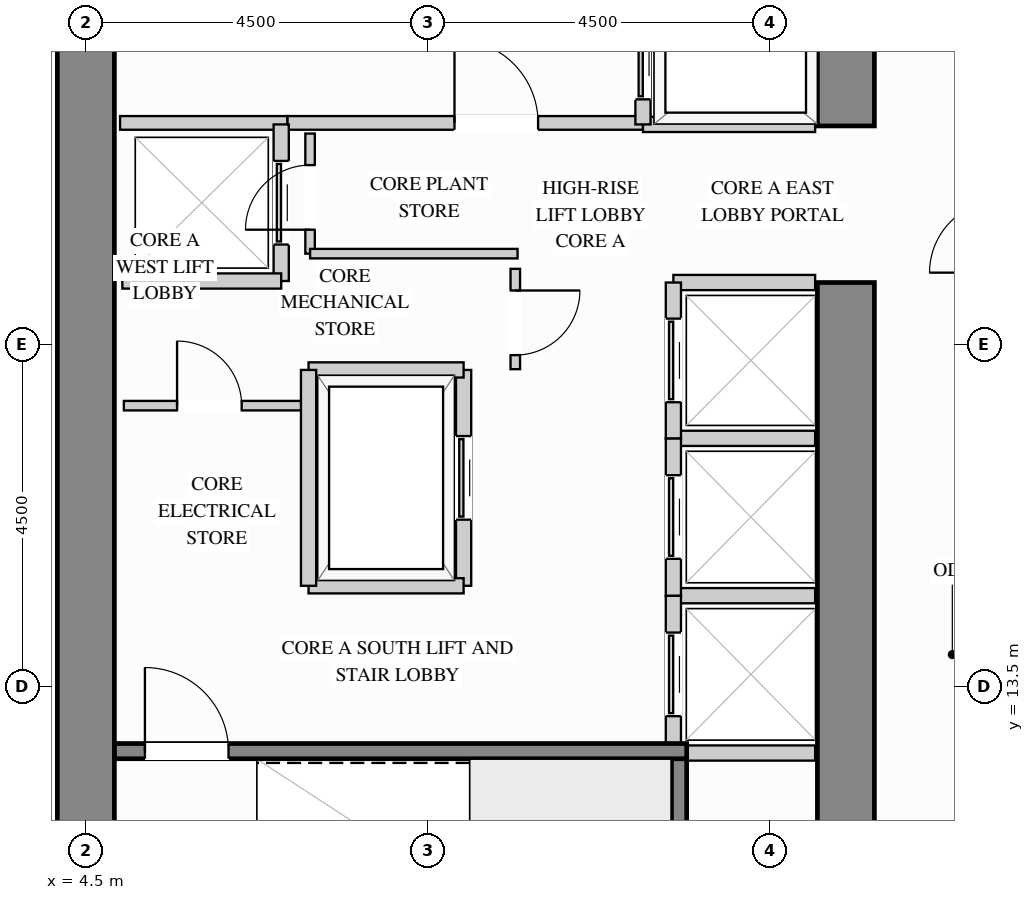
"""IFC4 building model, lengths in metres.
Left out: names, types, materials, properties, quantities, classifications, styles, units other than length and angle.
Written with IfcOpenShell. Run it as: python <this file> out.ifc"""

import sys

from ifc_helpers import new_model, si_unit, direction, frame, frame_2d, origin, place, context, subcontext, project, spatial, rectangle, extrude, source, transform, mapped, element, fill, save


model = new_model("IFC4")
c1 = context("Model", 3, precision=1e-05, world=origin(), true_north=direction((0.0, 1.0)))
c2 = subcontext(c1, "Body", "Model", "MODEL_VIEW")
j1 = project(units=[si_unit("LENGTHUNIT", "METRE"), si_unit("PLANEANGLEUNIT", "RADIAN")], contexts=[c1])
p1 = place(None, origin())
s1 = spatial("IfcSite", under=j1, at=p1, CompositionType="ELEMENT")
p2 = place(p1, origin())
s2 = spatial("IfcBuilding", under=s1, at=p2, CompositionType="ELEMENT")
p3 = place(p2, frame((0.0, 0.0, 109.8)))
s3 = spatial("IfcBuildingStorey", under=s2, at=p3, CompositionType="ELEMENT", Elevation=109.8)
m1 = source(origin(), c2, "Body", "SweptSolid", [
    extrude(rectangle(XDim=9.945, YDim=0.75, at=frame_2d((4.973, 0.0))), origin(), (0.0, 0.0, 1.0), 3.38),
])
p4 = place(p3, frame((14.5, 8.875, 0.0), z_axis=(0.0, 0.0, 1.0), x_axis=(0.0, 1.0, 0.0)))
e1 = element("IfcWall", 1, at=p4, inside=s3, PredefinedType="SHEAR", context=c2, shape_type="MappedRepresentation", body=[
    mapped(m1, transform((0.0, 0.0, 0.0), x_axis=(1.0, 0.0, 0.0), y_axis=(0.0, 1.0, 0.0), z_axis=(0.0, 0.0, 1.0))),
])
m2 = source(origin(), c2, "Body", "SweptSolid", [
    extrude(rectangle(XDim=8.245, YDim=0.75, at=frame_2d((4.123, 0.0))), origin(), (0.0, 0.0, 1.0), 3.38),
])
p5 = place(p3, frame((14.5, 20.88, 0.0), z_axis=(0.0, 0.0, 1.0), x_axis=(0.0, 1.0, 0.0)))
e2 = element("IfcWall", 2, at=p5, inside=s3, PredefinedType="SHEAR", context=c2, shape_type="MappedRepresentation", body=[
    mapped(m2, transform((0.0, 0.0, 0.0), x_axis=(1.0, 0.0, 0.0), y_axis=(0.0, 1.0, 0.0), z_axis=(0.0, 0.0, 1.0))),
])
m3 = source(origin(), c2, "Body", "SweptSolid", [
    extrude(rectangle(XDim=20.25, YDim=0.75, at=frame_2d((10.125, 0.0))), origin(), (0.0, 0.0, 1.0), 3.38),
])
p6 = place(p3, frame((4.5, 8.875, 0.0), z_axis=(0.0, 0.0, 1.0), x_axis=(0.0, 1.0, 0.0)))
e3 = element("IfcWall", 3, at=p6, inside=s3, PredefinedType="SHEAR", context=c2, shape_type="MappedRepresentation", body=[
    mapped(m3, transform((0.0, 0.0, 0.0), x_axis=(1.0, 0.0, 0.0), y_axis=(0.0, 1.0, 0.0), z_axis=(0.0, 0.0, 1.0))),
])
p7 = place(p3, frame((7.15, 20.92, 0.0), z_axis=(0.0, 0.0, 1.0), x_axis=(1.0, 0.0, 0.0)))
e4 = element("IfcWall", 4, at=p7, inside=s3, PredefinedType="PARTITIONING", context=c2, shape_type="SweptSolid", body=[
    extrude(rectangle(XDim=4.68, YDim=0.18, at=frame_2d((2.34, 0.0))), origin(), (0.0, 0.0, 1.0), 3.365),
])
p8 = place(p7, frame((2.2, 0.0, 0.0)))
e5 = element("IfcOpeningElement", 5, at=p8, cuts=e4, PredefinedType="OPENING", context=c2, shape_type="SweptSolid", body=[
    extrude(rectangle(XDim=1.1, YDim=2.15, at=frame_2d((0.55, 1.075))), frame((0.0, 0.1, 0.0), z_axis=(0.0, -1.0, 0.0), x_axis=(1.0, 0.0, 0.0)), (0.0, 0.0, 1.0), 0.2),
])
m4 = source(origin(), c2, "Body", "SweptSolid", [
    extrude(rectangle(XDim=2.2, YDim=0.18, at=frame_2d((1.1, 0.0))), origin(), (0.0, 0.0, 1.0), 3.365),
])
p9 = place(p3, frame((4.95, 20.92, 0.0), z_axis=(0.0, 0.0, 1.0), x_axis=(1.0, 0.0, 0.0)))
e6 = element("IfcWall", 6, at=p9, inside=s3, PredefinedType="PARTITIONING", context=c2, shape_type="MappedRepresentation", body=[
    mapped(m4, transform((0.0, 0.0, 0.0), x_axis=(1.0, 0.0, 0.0), y_axis=(0.0, 1.0, 0.0), z_axis=(0.0, 0.0, 1.0))),
])
p10 = place(p3, frame((10.15, 17.68, 0.0), z_axis=(0.0, 0.0, 1.0), x_axis=(0.0, 1.0, 0.0)))
e7 = element("IfcWall", 7, at=p10, inside=s3, PredefinedType="PARTITIONING", context=c2, shape_type="SweptSolid", body=[
    extrude(rectangle(XDim=1.32, YDim=0.125, at=frame_2d((0.66, 0.0))), origin(), (0.0, 0.0, 1.0), 3.365),
])
p11 = place(p10, frame((0.185, 0.0, 0.0)))
e8 = element("IfcOpeningElement", 8, at=p11, cuts=e7, PredefinedType="OPENING", context=c2, shape_type="SweptSolid", body=[
    extrude(rectangle(XDim=0.85, YDim=2.1, at=frame_2d((0.425, 1.05))), frame((0.0, 0.073, 0.0), z_axis=(0.0, -1.0, 0.0), x_axis=(1.0, 0.0, 0.0)), (0.0, 0.0, 1.0), 0.145),
])
p12 = place(p3, frame((7.45, 19.2, 0.0), z_axis=(0.0, 0.0, 1.0), x_axis=(0.0, 1.0, 0.0)))
e9 = element("IfcWall", 9, at=p12, inside=s3, PredefinedType="PARTITIONING", context=c2, shape_type="SweptSolid", body=[
    extrude(rectangle(XDim=1.58, YDim=0.125, at=frame_2d((0.79, 0.0))), origin(), (0.0, 0.0, 1.0), 3.365),
])
p13 = place(p12, frame((0.315, 0.0, 0.0)))
e10 = element("IfcOpeningElement", 10, at=p13, cuts=e9, PredefinedType="OPENING", context=c2, shape_type="SweptSolid", body=[
    extrude(rectangle(XDim=0.85, YDim=2.1, at=frame_2d((0.425, 1.05))), frame((0.0, 0.073, 0.0), z_axis=(0.0, -1.0, 0.0), x_axis=(1.0, 0.0, 0.0)), (0.0, 0.0, 1.0), 0.145),
])
m5 = source(origin(), c2, "Body", "SweptSolid", [
    extrude(rectangle(XDim=2.73, YDim=0.125, at=frame_2d((1.365, 0.0))), origin(), (0.0, 0.0, 1.0), 3.365),
])
p14 = place(p3, frame((7.45, 19.2, 0.0), z_axis=(0.0, 0.0, 1.0), x_axis=(1.0, 0.0, 0.0)))
e11 = element("IfcWall", 11, at=p14, inside=s3, PredefinedType="PARTITIONING", context=c2, shape_type="MappedRepresentation", body=[
    mapped(m5, transform((0.0, 0.0, 0.0), x_axis=(1.0, 0.0, 0.0), y_axis=(0.0, 1.0, 0.0), z_axis=(0.0, 0.0, 1.0))),
])
p15 = place(p3, frame((5.0, 17.2, 0.0), z_axis=(0.0, 0.0, 1.0), x_axis=(1.0, 0.0, 0.0)))
e12 = element("IfcWall", 12, at=p15, inside=s3, PredefinedType="PARTITIONING", context=c2, shape_type="SweptSolid", body=[
    extrude(rectangle(XDim=2.4, YDim=0.125, at=frame_2d((1.2, 0.0))), origin(), (0.0, 0.0, 1.0), 3.365),
])
p16 = place(p15, frame((0.7, 0.0, 0.0)))
e13 = element("IfcOpeningElement", 13, at=p16, cuts=e12, PredefinedType="OPENING", context=c2, shape_type="SweptSolid", body=[
    extrude(rectangle(XDim=0.85, YDim=2.1, at=frame_2d((0.425, 1.05))), frame((0.0, 0.073, 0.0), z_axis=(0.0, -1.0, 0.0), x_axis=(1.0, 0.0, 0.0)), (0.0, 0.0, 1.0), 0.145),
])
m6 = source(origin(), c2, "Body", "SweptSolid", [
    extrude(rectangle(XDim=2.265, YDim=0.2, at=frame_2d((1.132, 0.0))), origin(), (0.0, 0.0, 1.0), 3.365),
])
p17 = place(p3, frame((11.83, 20.9, 0.0), z_axis=(0.0, 0.0, 1.0), x_axis=(1.0, 0.0, 0.0)))
e14 = element("IfcWall", 14, at=p17, inside=s3, PredefinedType="PARTITIONING", context=c2, shape_type="MappedRepresentation", body=[
    mapped(m6, transform((0.0, 0.0, 0.0), x_axis=(1.0, 0.0, 0.0), y_axis=(0.0, 1.0, 0.0), z_axis=(0.0, 0.0, 1.0))),
])
p18 = place(p3, frame((11.83, 20.9, 0.0), z_axis=(0.0, 0.0, 1.0), x_axis=(0.0, 1.0, 0.0)))
e15 = element("IfcWall", 15, at=p18, inside=s3, PredefinedType="PARTITIONING", context=c2, shape_type="SweptSolid", body=[
    extrude(rectangle(XDim=1.76, YDim=0.2, at=frame_2d((0.88, 0.0))), origin(), (0.0, 0.0, 1.0), 3.365),
])
p19 = place(p18, frame((0.33, 0.0, 0.0)))
e16 = element("IfcOpeningElement", 16, at=p19, cuts=e15, PredefinedType="OPENING", context=c2, shape_type="SweptSolid", body=[
    extrude(rectangle(XDim=1.1, YDim=2.2, at=frame_2d((0.55, 1.1))), frame((0.0, 0.11, 0.0), z_axis=(0.0, -1.0, 0.0), x_axis=(1.0, 0.0, 0.0)), (0.0, 0.0, 1.0), 0.22),
])
m7 = source(origin(), c2, "Body", "SweptSolid", [
    extrude(rectangle(XDim=1.865, YDim=0.2, at=frame_2d((0.933, 0.0))), origin(), (0.0, 0.0, 1.0), 3.365),
])
for number, where, z_axis, x_axis in (
    (17, (12.23, 14.7, 0.0), (0.0, 0.0, 1.0), (1.0, 0.0, 0.0)),
    (18, (12.23, 12.63, 0.0), (0.0, 0.0, 1.0), (1.0, 0.0, 0.0)),
):
    element("IfcWall", number, at=place(p3, frame(where, z_axis=z_axis, x_axis=x_axis)), inside=s3, PredefinedType="PARTITIONING", context=c2, shape_type="MappedRepresentation", body=[
        mapped(m7, transform((0.0, 0.0, 0.0), x_axis=(1.0, 0.0, 0.0), y_axis=(0.0, 1.0, 0.0), z_axis=(0.0, 0.0, 1.0))),
    ])
p20 = place(p3, frame((12.23, 12.63, 0.0), z_axis=(0.0, 0.0, 1.0), x_axis=(0.0, 1.0, 0.0)))
e19 = element("IfcWall", 19, at=p20, inside=s3, PredefinedType="PARTITIONING", context=c2, shape_type="SweptSolid", body=[
    extrude(rectangle(XDim=2.07, YDim=0.2, at=frame_2d((1.035, 0.0))), origin(), (0.0, 0.0, 1.0), 3.365),
])
p21 = place(p20, frame((0.485, 0.0, 0.0)))
e20 = element("IfcOpeningElement", 20, at=p21, cuts=e19, PredefinedType="OPENING", context=c2, shape_type="SweptSolid", body=[
    extrude(rectangle(XDim=1.1, YDim=2.2, at=frame_2d((0.55, 1.1))), frame((0.0, 0.11, 0.0), z_axis=(0.0, -1.0, 0.0), x_axis=(1.0, 0.0, 0.0)), (0.0, 0.0, 1.0), 0.22),
])
p22 = place(p3, frame((12.23, 16.77, 0.0), z_axis=(0.0, 0.0, 1.0), x_axis=(1.0, 0.0, 0.0)))
e21 = element("IfcWall", 21, at=p22, inside=s3, PredefinedType="PARTITIONING", context=c2, shape_type="MappedRepresentation", body=[
    mapped(m7, transform((0.0, 0.0, 0.0), x_axis=(1.0, 0.0, 0.0), y_axis=(0.0, 1.0, 0.0), z_axis=(0.0, 0.0, 1.0))),
])
p23 = place(p3, frame((12.23, 14.7, 0.0), z_axis=(0.0, 0.0, 1.0), x_axis=(0.0, 1.0, 0.0)))
e22 = element("IfcWall", 22, at=p23, inside=s3, PredefinedType="PARTITIONING", context=c2, shape_type="SweptSolid", body=[
    extrude(rectangle(XDim=2.07, YDim=0.2, at=frame_2d((1.035, 0.0))), origin(), (0.0, 0.0, 1.0), 3.365),
])
p24 = place(p23, frame((0.485, 0.0, 0.0)))
e23 = element("IfcOpeningElement", 23, at=p24, cuts=e22, PredefinedType="OPENING", context=c2, shape_type="SweptSolid", body=[
    extrude(rectangle(XDim=1.1, YDim=2.2, at=frame_2d((0.55, 1.1))), frame((0.0, 0.11, 0.0), z_axis=(0.0, -1.0, 0.0), x_axis=(1.0, 0.0, 0.0)), (0.0, 0.0, 1.0), 0.22),
])
p25 = place(p3, frame((12.23, 18.82, 0.0), z_axis=(0.0, 0.0, 1.0), x_axis=(1.0, 0.0, 0.0)))
e24 = element("IfcWall", 24, at=p25, inside=s3, PredefinedType="PARTITIONING", context=c2, shape_type="MappedRepresentation", body=[
    mapped(m7, transform((0.0, 0.0, 0.0), x_axis=(1.0, 0.0, 0.0), y_axis=(0.0, 1.0, 0.0), z_axis=(0.0, 0.0, 1.0))),
])
p26 = place(p3, frame((12.23, 16.77, 0.0), z_axis=(0.0, 0.0, 1.0), x_axis=(0.0, 1.0, 0.0)))
e25 = element("IfcWall", 25, at=p26, inside=s3, PredefinedType="PARTITIONING", context=c2, shape_type="SweptSolid", body=[
    extrude(rectangle(XDim=2.05, YDim=0.2, at=frame_2d((1.025, 0.0))), origin(), (0.0, 0.0, 1.0), 3.365),
])
p27 = place(p26, frame((0.475, 0.0, 0.0)))
e26 = element("IfcOpeningElement", 26, at=p27, cuts=e25, PredefinedType="OPENING", context=c2, shape_type="SweptSolid", body=[
    extrude(rectangle(XDim=1.1, YDim=2.2, at=frame_2d((0.55, 1.1))), frame((0.0, 0.11, 0.0), z_axis=(0.0, -1.0, 0.0), x_axis=(1.0, 0.0, 0.0)), (0.0, 0.0, 1.0), 0.22),
])
p28 = place(p3, frame((7.07, 18.84, 0.0), z_axis=(0.0, 0.0, 1.0), x_axis=(0.0, 1.0, 0.0)))
e27 = element("IfcWall", 27, at=p28, inside=s3, PredefinedType="PARTITIONING", context=c2, shape_type="SweptSolid", body=[
    extrude(rectangle(XDim=2.06, YDim=0.2, at=frame_2d((1.03, 0.0))), origin(), (0.0, 0.0, 1.0), 3.365),
])
p29 = place(p28, frame((0.48, 0.0, 0.0)))
e28 = element("IfcOpeningElement", 28, at=p29, cuts=e27, PredefinedType="OPENING", context=c2, shape_type="SweptSolid", body=[
    extrude(rectangle(XDim=1.1, YDim=2.2, at=frame_2d((0.55, 1.1))), frame((0.0, 0.11, 0.0), z_axis=(0.0, -1.0, 0.0), x_axis=(1.0, 0.0, 0.0)), (0.0, 0.0, 1.0), 0.22),
])
m8 = source(origin(), c2, "Body", "SweptSolid", [
    extrude(rectangle(XDim=2.09, YDim=0.2, at=frame_2d((1.045, 0.0))), origin(), (0.0, 0.0, 1.0), 3.365),
])
p30 = place(p3, frame((4.98, 18.84, 0.0), z_axis=(0.0, 0.0, 1.0), x_axis=(1.0, 0.0, 0.0)))
e29 = element("IfcWall", 29, at=p30, inside=s3, PredefinedType="PARTITIONING", context=c2, shape_type="MappedRepresentation", body=[
    mapped(m8, transform((0.0, 0.0, 0.0), x_axis=(1.0, 0.0, 0.0), y_axis=(0.0, 1.0, 0.0), z_axis=(0.0, 0.0, 1.0))),
])
p31 = place(p3, frame((9.47, 14.83, 0.0), z_axis=(0.0, 0.0, 1.0), x_axis=(0.0, 1.0, 0.0)))
e30 = element("IfcWall", 30, at=p31, inside=s3, PredefinedType="PARTITIONING", context=c2, shape_type="SweptSolid", body=[
    extrude(rectangle(XDim=2.84, YDim=0.2, at=frame_2d((1.42, 0.0))), origin(), (0.0, 0.0, 1.0), 3.365),
])
p32 = place(p31, frame((0.87, 0.0, 0.0)))
e31 = element("IfcOpeningElement", 31, at=p32, cuts=e30, PredefinedType="OPENING", context=c2, shape_type="SweptSolid", body=[
    extrude(rectangle(XDim=1.1, YDim=2.2, at=frame_2d((0.55, 1.1))), frame((0.0, 0.11, 0.0), z_axis=(0.0, -1.0, 0.0), x_axis=(1.0, 0.0, 0.0)), (0.0, 0.0, 1.0), 0.22),
])
m9 = source(origin(), c2, "Body", "SweptSolid", [
    extrude(rectangle(XDim=2.04, YDim=0.2, at=frame_2d((1.02, 0.0))), origin(), (0.0, 0.0, 1.0), 3.365),
])
for number, where, z_axis, x_axis in (
    (32, (7.43, 17.67, 0.0), (0.0, 0.0, 1.0), (1.0, 0.0, 0.0)),
    (33, (7.43, 14.83, 0.0), (0.0, 0.0, 1.0), (1.0, 0.0, 0.0)),
):
    element("IfcWall", number, at=place(p3, frame(where, z_axis=z_axis, x_axis=x_axis)), inside=s3, PredefinedType="PARTITIONING", context=c2, shape_type="MappedRepresentation", body=[
        mapped(m9, transform((0.0, 0.0, 0.0), x_axis=(1.0, 0.0, 0.0), y_axis=(0.0, 1.0, 0.0), z_axis=(0.0, 0.0, 1.0))),
    ])
m10 = source(origin(), c2, "Body", "SweptSolid", [
    extrude(rectangle(XDim=2.84, YDim=0.2, at=frame_2d((1.42, 0.0))), origin(), (0.0, 0.0, 1.0), 3.365),
])
p33 = place(p3, frame((7.43, 14.83, 0.0), z_axis=(0.0, 0.0, 1.0), x_axis=(0.0, 1.0, 0.0)))
e34 = element("IfcWall", 34, at=p33, inside=s3, PredefinedType="PARTITIONING", context=c2, shape_type="MappedRepresentation", body=[
    mapped(m10, transform((0.0, 0.0, 0.0), x_axis=(1.0, 0.0, 0.0), y_axis=(0.0, 1.0, 0.0), z_axis=(0.0, 0.0, 1.0))),
])
m11 = source(origin(), c2, "Body", "SweptSolid", [
    extrude(rectangle(XDim=3.678, YDim=0.2, at=frame_2d((1.839, 0.0))), origin(), (0.0, 0.0, 1.0), 3.38),
])
p34 = place(p3, frame((12.305, 8.877, 0.0), z_axis=(0.0, 0.0, 1.0), x_axis=(0.0, 1.0, 0.0)))
e35 = element("IfcWall", 35, at=p34, inside=s3, PredefinedType="SHEAR", context=c2, shape_type="MappedRepresentation", body=[
    mapped(m11, transform((0.0, 0.0, 0.0), x_axis=(1.0, 0.0, 0.0), y_axis=(0.0, 1.0, 0.0), z_axis=(0.0, 0.0, 1.0))),
])
p35 = place(p3, frame((4.877, 12.655, 0.0), z_axis=(0.0, 0.0, 1.0), x_axis=(1.0, 0.0, 0.0)))
e36 = element("IfcWall", 36, at=p35, inside=s3, PredefinedType="SHEAR", context=c2, shape_type="SweptSolid", body=[
    extrude(rectangle(XDim=7.528, YDim=0.2, at=frame_2d((3.764, 0.0))), origin(), (0.0, 0.0, 1.0), 3.38),
])
p36 = place(p35, frame((0.4, 0.0, 0.0)))
e37 = element("IfcOpeningElement", 37, at=p36, cuts=e36, PredefinedType="OPENING", context=c2, shape_type="SweptSolid", body=[
    extrude(rectangle(XDim=1.1, YDim=2.15, at=frame_2d((0.55, 1.075))), frame((0.0, 0.11, 0.0), z_axis=(0.0, -1.0, 0.0), x_axis=(1.0, 0.0, 0.0)), (0.0, 0.0, 1.0), 0.22),
])
m12 = source(origin(), c2, "Body", "SweptSolid", [
    extrude(rectangle(XDim=1.1, YDim=2.15, at=frame_2d((0.55, 1.075))), frame((0.0, 0.025, 0.0), z_axis=(0.0, -1.0, 0.0), x_axis=(1.0, 0.0, 0.0)), (0.0, 0.0, 1.0), 0.05),
])
p37 = place(p8, origin())
e38 = element("IfcDoor", 38, at=p37, inside=s3, OperationType="SINGLE_SWING_LEFT", PredefinedType="DOOR", context=c2, shape_type="MappedRepresentation", body=[
    mapped(m12, transform((0.0, 0.0, 0.0), x_axis=(1.0, 0.0, 0.0), y_axis=(0.0, 1.0, 0.0), z_axis=(0.0, 0.0, 1.0))),
])
fill(e5, e38)
m13 = source(origin(), c2, "Body", "SweptSolid", [
    extrude(rectangle(XDim=1.1, YDim=2.2, at=frame_2d((0.55, 1.1))), frame((0.0, 0.025, 0.0), z_axis=(0.0, -1.0, 0.0), x_axis=(1.0, 0.0, 0.0)), (0.0, 0.0, 1.0), 0.05),
])
p38 = place(p19, origin())
e39 = element("IfcDoor", 39, at=p38, inside=s3, OperationType="SLIDING_TO_LEFT", PredefinedType="DOOR", context=c2, shape_type="MappedRepresentation", body=[
    mapped(m13, transform((0.0, 0.0, 0.0), x_axis=(1.0, 0.0, 0.0), y_axis=(0.0, 1.0, 0.0), z_axis=(0.0, 0.0, 1.0))),
])
fill(e16, e39)
p39 = place(p21, origin())
e40 = element("IfcDoor", 40, at=p39, inside=s3, OperationType="SLIDING_TO_LEFT", PredefinedType="DOOR", context=c2, shape_type="MappedRepresentation", body=[
    mapped(m13, transform((0.0, 0.0, 0.0), x_axis=(1.0, 0.0, 0.0), y_axis=(0.0, 1.0, 0.0), z_axis=(0.0, 0.0, 1.0))),
])
fill(e20, e40)
p40 = place(p24, origin())
e41 = element("IfcDoor", 41, at=p40, inside=s3, OperationType="SLIDING_TO_LEFT", PredefinedType="DOOR", context=c2, shape_type="MappedRepresentation", body=[
    mapped(m13, transform((0.0, 0.0, 0.0), x_axis=(1.0, 0.0, 0.0), y_axis=(0.0, 1.0, 0.0), z_axis=(0.0, 0.0, 1.0))),
])
fill(e23, e41)
p41 = place(p27, origin())
e42 = element("IfcDoor", 42, at=p41, inside=s3, OperationType="SLIDING_TO_LEFT", PredefinedType="DOOR", context=c2, shape_type="MappedRepresentation", body=[
    mapped(m13, transform((0.0, 0.0, 0.0), x_axis=(1.0, 0.0, 0.0), y_axis=(0.0, 1.0, 0.0), z_axis=(0.0, 0.0, 1.0))),
])
fill(e26, e42)
p42 = place(p29, origin())
e43 = element("IfcDoor", 43, at=p42, inside=s3, OperationType="SLIDING_TO_LEFT", PredefinedType="DOOR", context=c2, shape_type="MappedRepresentation", body=[
    mapped(m13, transform((0.0, 0.0, 0.0), x_axis=(1.0, 0.0, 0.0), y_axis=(0.0, 1.0, 0.0), z_axis=(0.0, 0.0, 1.0))),
])
fill(e28, e43)
p43 = place(p32, origin())
e44 = element("IfcDoor", 44, at=p43, inside=s3, OperationType="SLIDING_TO_LEFT", PredefinedType="DOOR", context=c2, shape_type="MappedRepresentation", body=[
    mapped(m13, transform((0.0, 0.0, 0.0), x_axis=(1.0, 0.0, 0.0), y_axis=(0.0, 1.0, 0.0), z_axis=(0.0, 0.0, 1.0))),
])
fill(e31, e44)
m14 = source(origin(), c2, "Body", "SweptSolid", [
    extrude(rectangle(XDim=0.85, YDim=2.1, at=frame_2d((0.425, 1.05))), frame((0.0, 0.025, 0.0), z_axis=(0.0, -1.0, 0.0), x_axis=(1.0, 0.0, 0.0)), (0.0, 0.0, 1.0), 0.05),
])
p44 = place(p11, origin())
e45 = element("IfcDoor", 45, at=p44, inside=s3, OperationType="SINGLE_SWING_RIGHT", PredefinedType="DOOR", context=c2, shape_type="MappedRepresentation", body=[
    mapped(m14, transform((0.0, 0.0, 0.0), x_axis=(1.0, 0.0, 0.0), y_axis=(0.0, 1.0, 0.0), z_axis=(0.0, 0.0, 1.0))),
])
fill(e8, e45)
p45 = place(p16, origin())
e46 = element("IfcDoor", 46, at=p45, inside=s3, OperationType="SINGLE_SWING_LEFT", PredefinedType="DOOR", context=c2, shape_type="MappedRepresentation", body=[
    mapped(m14, transform((0.0, 0.0, 0.0), x_axis=(1.0, 0.0, 0.0), y_axis=(0.0, 1.0, 0.0), z_axis=(0.0, 0.0, 1.0))),
])
fill(e13, e46)
p46 = place(p13, origin())
e47 = element("IfcDoor", 47, at=p46, inside=s3, OperationType="SINGLE_SWING_LEFT", PredefinedType="DOOR", context=c2, shape_type="MappedRepresentation", body=[
    mapped(m14, transform((0.0, 0.0, 0.0), x_axis=(1.0, 0.0, 0.0), y_axis=(0.0, 1.0, 0.0), z_axis=(0.0, 0.0, 1.0))),
])
fill(e10, e47)
m15 = source(origin(), c2, "Body", "SweptSolid", [
    extrude(rectangle(XDim=1.1, YDim=2.15, at=frame_2d((0.55, 1.075))), frame((0.0, 0.025, 0.0), z_axis=(0.0, -1.0, 0.0), x_axis=(1.0, 0.0, 0.0)), (0.0, 0.0, 1.0), 0.05),
])
p47 = place(p36, origin())
e48 = element("IfcDoor", 48, at=p47, inside=s3, OperationType="SINGLE_SWING_LEFT", PredefinedType="DOOR", context=c2, shape_type="MappedRepresentation", body=[
    mapped(m15, transform((0.0, 0.0, 0.0), x_axis=(1.0, 0.0, 0.0), y_axis=(0.0, 1.0, 0.0), z_axis=(0.0, 0.0, 1.0))),
])
fill(e37, e48)
save(model, sys.argv[1])
